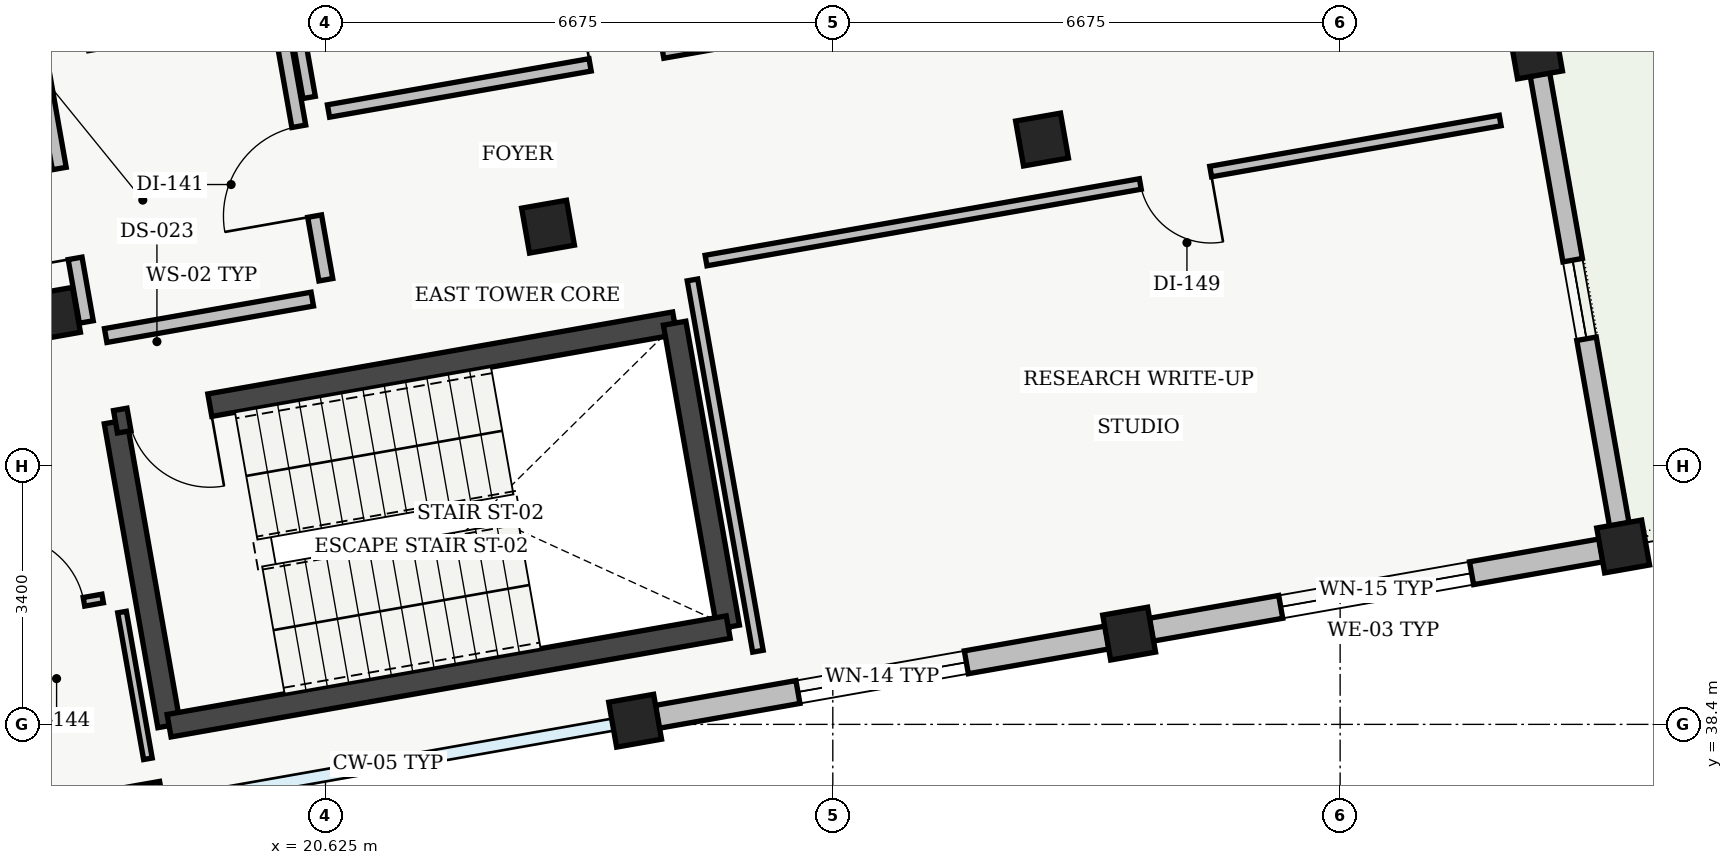
"""IFC4 building model, lengths in metres.
Left out: names, types, materials, properties, quantities, classifications, styles, units other than length and angle.
Written with IfcOpenShell. Run it as: python <this file> out.ifc"""

import sys

from ifc_helpers import new_model, si_unit, direction, frame, frame_2d, origin, origin_2d, place, context, subcontext, project, spatial, rectangle, extrude, element, fill, save


model = new_model("IFC4")
c1 = context("Model", 3, precision=1e-05, world=origin(), true_north=direction((0.0, 1.0)))
c2 = subcontext(c1, "Body", "Model", "MODEL_VIEW")
j1 = project(units=[si_unit("LENGTHUNIT", "METRE"), si_unit("PLANEANGLEUNIT", "RADIAN")], contexts=[c1])
p1 = place(None, origin())
s1 = spatial("IfcSite", under=j1, at=p1, CompositionType="ELEMENT")
p2 = place(p1, origin())
s2 = spatial("IfcBuilding", under=s1, at=p2, CompositionType="ELEMENT")
p3 = place(p2, frame((0.0, 0.0, 36.6)))
s3 = spatial("IfcBuildingStorey", under=s2, at=p3, CompositionType="ELEMENT", Elevation=36.6)
for number, where, z_axis, x_axis in (
    (1, (18.199, 37.302, 0.0), (0.0, 0.0, 1.0), (0.985, 0.174, 0.0)),
    (2, (17.053, 43.802, 0.0), (0.0, 0.0, 1.0), (0.985, 0.174, 0.0)),
    (3, (24.699, 38.448, 0.0), (0.0, 0.0, 1.0), (0.985, 0.174, 0.0)),
    (4, (23.553, 44.948, 0.0), (0.0, 0.0, 1.0), (0.985, 0.174, 0.0)),
    (5, (31.199, 39.594, 0.0), (0.0, 0.0, 1.0), (0.985, 0.174, 0.0)),
    (6, (30.053, 46.094, 0.0), (0.0, 0.0, 1.0), (0.985, 0.174, 0.0)),
    (7, (37.699, 40.74, 0.0), (0.0, 0.0, 1.0), (0.985, 0.174, 0.0)),
    (8, (36.552, 47.24, 0.0), (0.0, 0.0, 1.0), (0.985, 0.174, 0.0)),
):
    element("IfcColumn", number, at=place(p3, frame(where, z_axis=z_axis, x_axis=x_axis)), inside=s3, PredefinedType="COLUMN", context=c2, shape_type="SweptSolid", body=[
        extrude(rectangle(XDim=0.6, YDim=0.6, at=origin_2d()), origin(), (0.0, 0.0, 1.0), 4.02),
    ])
p4 = place(p3, frame((36.604, 46.95, 0.0), z_axis=(0.0, 0.0, 1.0), x_axis=(0.173660194111, -0.984805634113, 0.0)))
e9 = element("IfcWall", 9, at=p4, inside=s3, PredefinedType="STANDARD", context=c2, shape_type="SweptSolid", body=[
    extrude(rectangle(XDim=6.01, YDim=0.26, at=frame_2d((3.005, 0.0))), origin(), (0.0, 0.0, 1.0), 3.555),
])
p5 = place(p4, frame((2.48, 0.0, 0.95)))
e10 = element("IfcOpeningElement", 10, at=p5, cuts=e9, PredefinedType="OPENING", context=c2, shape_type="SweptSolid", body=[
    extrude(rectangle(XDim=1.05, YDim=1.2, at=frame_2d((0.525, 0.6))), frame((0.0, 0.13, 0.0), z_axis=(0.0, -1.0, 0.0), x_axis=(1.0, 0.0, 0.0)), (0.0, 0.0, 1.0), 0.26),
])
p6 = place(p3, frame((37.408, 40.689, 0.0), z_axis=(0.0, 0.0, 1.0), x_axis=(-0.984805634113, -0.173660194111, 0.0)))
e11 = element("IfcWall", 11, at=p6, inside=s3, PredefinedType="STANDARD", context=c2, shape_type="SweptSolid", body=[
    extrude(rectangle(XDim=6.01, YDim=0.305, at=frame_2d((3.005, 0.0))), origin(), (0.0, 0.0, 1.0), 3.555),
])
p7 = place(p6, frame((1.73, 0.0, 0.95)))
e12 = element("IfcOpeningElement", 12, at=p7, cuts=e11, PredefinedType="OPENING", context=c2, shape_type="SweptSolid", body=[
    extrude(rectangle(XDim=2.55, YDim=1.75, at=frame_2d((1.275, 0.875))), frame((0.0, 0.152, 0.0), z_axis=(0.0, -1.0, 0.0), x_axis=(1.0, 0.0, 0.0)), (0.0, 0.0, 1.0), 0.305),
])
p8 = place(p3, frame((30.908, 39.543, 0.0), z_axis=(0.0, 0.0, 1.0), x_axis=(-0.984812580657, -0.173620796507, 0.0)))
e13 = element("IfcWall", 13, at=p8, inside=s3, PredefinedType="STANDARD", context=c2, shape_type="SweptSolid", body=[
    extrude(rectangle(XDim=6.01, YDim=0.305, at=frame_2d((3.005, 0.0))), origin(), (0.0, 0.0, 1.0), 3.555),
])
p9 = place(p8, frame((1.88, 0.0, 0.95)))
e14 = element("IfcOpeningElement", 14, at=p9, cuts=e13, PredefinedType="OPENING", context=c2, shape_type="SweptSolid", body=[
    extrude(rectangle(XDim=2.25, YDim=1.55, at=frame_2d((1.125, 0.775))), frame((0.0, 0.152, 0.0), z_axis=(0.0, -1.0, 0.0), x_axis=(1.0, 0.0, 0.0)), (0.0, 0.0, 1.0), 0.305),
])
p10 = place(p3, frame((18.567, 38.383, 0.0), z_axis=(0.0, 0.0, 1.0), x_axis=(-0.173606946886, 0.984815022221, 0.0)))
e15 = element("IfcWall", 15, at=p10, inside=s3, PredefinedType="SHEAR", context=c2, shape_type="SweptSolid", body=[
    extrude(rectangle(XDim=4.06, YDim=0.3, at=frame_2d((2.03, 0.0))), origin(), (0.0, 0.0, 1.0), 3.98),
])
p11 = place(p3, frame((17.863, 42.381, 0.0), z_axis=(0.0, 0.0, 1.0), x_axis=(0.984808225754, 0.173645496596, 0.0)))
e16 = element("IfcWall", 16, at=p11, inside=s3, PredefinedType="SHEAR", context=c2, shape_type="SweptSolid", body=[
    extrude(rectangle(XDim=7.47, YDim=0.3, at=frame_2d((3.735, 0.0))), origin(), (0.0, 0.0, 1.0), 3.98),
])
p12 = place(p11, frame((0.18, 0.0, 0.0)))
e17 = element("IfcOpeningElement", 17, at=p12, cuts=e16, PredefinedType="OPENING", context=c2, shape_type="SweptSolid", body=[
    extrude(rectangle(XDim=1.08, YDim=2.15, at=frame_2d((0.54, 1.075))), frame((0.0, 0.15, 0.0), z_axis=(0.0, -1.0, 0.0), x_axis=(1.0, 0.0, 0.0)), (0.0, 0.0, 1.0), 0.3),
])
p13 = place(p3, frame((25.219, 43.678, 0.0), z_axis=(0.0, 0.0, 1.0), x_axis=(0.173665267602, -0.984804739443, 0.0)))
e18 = element("IfcWall", 18, at=p13, inside=s3, PredefinedType="SHEAR", context=c2, shape_type="SweptSolid", body=[
    extrude(rectangle(XDim=4.06, YDim=0.3, at=frame_2d((2.03, 0.0))), origin(), (0.0, 0.0, 1.0), 3.98),
])
p14 = place(p3, frame((25.924, 39.68, 0.0), z_axis=(0.0, 0.0, 1.0), x_axis=(-0.984809211193, -0.173639907711, 0.0)))
e19 = element("IfcWall", 19, at=p14, inside=s3, PredefinedType="SHEAR", context=c2, shape_type="SweptSolid", body=[
    extrude(rectangle(XDim=7.47, YDim=0.3, at=frame_2d((3.735, 0.0))), origin(), (0.0, 0.0, 1.0), 3.98),
])
p15 = place(p3, frame((17.733, 43.516, 0.0), z_axis=(0.0, 0.0, 1.0), x_axis=(0.984808483292, 0.173644035992, 0.0)))
e20 = element("IfcWall", 20, at=p15, inside=s3, PredefinedType="SOLIDWALL", context=c2, shape_type="SweptSolid", body=[
    extrude(rectangle(XDim=2.76, YDim=0.185, at=frame_2d((1.38, 0.0))), origin(), (0.0, 0.0, 1.0), 3.65),
])
p16 = place(p3, frame((20.63, 44.25, 0.0), z_axis=(0.0, 0.0, 1.0), x_axis=(-0.173621956536, 0.984812376145, 0.0)))
e21 = element("IfcWall", 21, at=p16, inside=s3, PredefinedType="SOLIDWALL", context=c2, shape_type="SweptSolid", body=[
    extrude(rectangle(XDim=3.41, YDim=0.185, at=frame_2d((1.705, 0.0))), origin(), (0.0, 0.0, 1.0), 3.65),
])
p17 = place(p16, frame((0.85, 0.0, 0.0)))
e22 = element("IfcOpeningElement", 22, at=p17, cuts=e21, PredefinedType="OPENING", context=c2, shape_type="SweptSolid", body=[
    extrude(rectangle(XDim=1.2, YDim=2.15, at=frame_2d((0.6, 1.075))), frame((0.0, 0.093, 0.0), z_axis=(0.0, -1.0, 0.0), x_axis=(1.0, 0.0, 0.0)), (0.0, 0.0, 1.0), 0.185),
])
p18 = place(p3, frame((16.886, 47.052, 0.0), z_axis=(0.0, 0.0, 1.0), x_axis=(0.173621956536, -0.984812376145, 0.0)))
e23 = element("IfcWall", 23, at=p18, inside=s3, PredefinedType="SOLIDWALL", context=c2, shape_type="SweptSolid", body=[
    extrude(rectangle(XDim=3.41, YDim=0.185, at=frame_2d((1.705, 0.0))), origin(), (0.0, 0.0, 1.0), 3.65),
])
p19 = place(p18, frame((1.36, 0.0, 0.0)))
e24 = element("IfcOpeningElement", 24, at=p19, cuts=e23, PredefinedType="OPENING", context=c2, shape_type="SweptSolid", body=[
    extrude(rectangle(XDim=1.2, YDim=2.15, at=frame_2d((0.6, 1.075))), frame((0.0, 0.093, 0.0), z_axis=(0.0, -1.0, 0.0), x_axis=(1.0, 0.0, 0.0)), (0.0, 0.0, 1.0), 0.185),
])
p20 = place(p3, frame((18.289, 37.948, 0.0), z_axis=(0.0, 0.0, 1.0), x_axis=(-0.173643211285, 0.984808628706, 0.0)))
e25 = element("IfcWall", 25, at=p20, inside=s3, PredefinedType="PARTITIONING", context=c2, shape_type="SweptSolid", body=[
    extrude(rectangle(XDim=1.96, YDim=0.115, at=frame_2d((0.98, 0.0))), origin(), (0.0, 0.0, 1.0), 3.455),
])
p21 = place(p3, frame((17.694, 40.056, 0.0), z_axis=(0.0, 0.0, 1.0), x_axis=(-0.984797734253, -0.173704987291, 0.0)))
e26 = element("IfcWall", 26, at=p21, inside=s3, PredefinedType="PARTITIONING", context=c2, shape_type="SweptSolid", body=[
    extrude(rectangle(XDim=1.56, YDim=0.115, at=frame_2d((0.78, 0.0))), origin(), (0.0, 0.0, 1.0), 3.65),
])
p22 = place(p21, frame((0.25, 0.0, 0.0)))
e27 = element("IfcOpeningElement", 27, at=p22, cuts=e26, PredefinedType="OPENING", context=c2, shape_type="SweptSolid", body=[
    extrude(rectangle(XDim=1.06, YDim=2.12, at=frame_2d((0.53, 1.06))), frame((0.0, 0.058, 0.0), z_axis=(0.0, -1.0, 0.0), x_axis=(1.0, 0.0, 0.0)), (0.0, 0.0, 1.0), 0.115),
])
p23 = place(p3, frame((20.665, 46.469, 0.0), z_axis=(0.0, 0.0, 1.0), x_axis=(0.984806090425, 0.173657606403, 0.0)))
e28 = element("IfcWall", 28, at=p23, inside=s3, PredefinedType="PARTITIONING", context=c2, shape_type="SweptSolid", body=[
    extrude(rectangle(XDim=7.96, YDim=0.165, at=frame_2d((3.98, 0.0))), origin(), (0.0, 0.0, 1.0), 3.555),
])
p24 = place(p23, frame((3.495, 0.0, 0.0)))
e29 = element("IfcOpeningElement", 29, at=p24, cuts=e28, PredefinedType="OPENING", context=c2, shape_type="SweptSolid", body=[
    extrude(rectangle(XDim=0.97, YDim=2.12, at=frame_2d((0.485, 1.06))), frame((0.0, 0.083, 0.0), z_axis=(0.0, -1.0, 0.0), x_axis=(1.0, 0.0, 0.0)), (0.0, 0.0, 1.0), 0.165),
])
p25 = place(p3, frame((18.611, 56.851, 0.0), z_axis=(0.0, 0.0, 1.0), x_axis=(0.173654930775, -0.984806562233, 0.0)))
e30 = element("IfcWall", 30, at=p25, inside=s3, PredefinedType="PARTITIONING", context=c2, shape_type="SweptSolid", body=[
    extrude(rectangle(XDim=10.36, YDim=0.165, at=frame_2d((5.18, 0.0))), origin(), (0.0, 0.0, 1.0), 3.65),
])
p26 = place(p3, frame((36.081, 46.345, 0.0), z_axis=(0.0, 0.0, 1.0), x_axis=(-0.984805557657, -0.173660627684, 0.0)))
e31 = element("IfcWall", 31, at=p26, inside=s3, PredefinedType="PARTITIONING", context=c2, shape_type="SweptSolid", body=[
    extrude(rectangle(XDim=10.61, YDim=0.14, at=frame_2d((5.305, 0.0))), origin(), (0.0, 0.0, 1.0), 3.65),
])
p27 = place(p26, frame((3.868, 0.0, 0.0)))
e32 = element("IfcOpeningElement", 32, at=p27, cuts=e31, PredefinedType="OPENING", context=c2, shape_type="SweptSolid", body=[
    extrude(rectangle(XDim=0.94, YDim=2.12, at=frame_2d((0.47, 1.06))), frame((0.0, 0.07, 0.0), z_axis=(0.0, -1.0, 0.0), x_axis=(1.0, 0.0, 0.0)), (0.0, 0.0, 1.0), 0.14),
])
p28 = place(p3, frame((25.454, 44.247, 0.0), z_axis=(0.0, 0.0, 1.0), x_axis=(0.173658971256, -0.98480584975, 0.0)))
e33 = element("IfcWall", 33, at=p28, inside=s3, PredefinedType="PARTITIONING", context=c2, shape_type="SweptSolid", body=[
    extrude(rectangle(XDim=4.96, YDim=0.14, at=frame_2d((2.48, 0.0))), origin(), (0.0, 0.0, 1.0), 3.65),
])
p29 = place(p5, origin())
e34 = element("IfcWindow", 34, at=p29, inside=s3, PartitioningType="SINGLE_PANEL", PredefinedType="WINDOW", context=c2, shape_type="SweptSolid", body=[
    extrude(rectangle(XDim=1.05, YDim=1.2, at=frame_2d((0.525, 0.6))), frame((0.0, 0.03, 0.0), z_axis=(0.0, -1.0, 0.0), x_axis=(1.0, 0.0, 0.0)), (0.0, 0.0, 1.0), 0.06),
])
fill(e10, e34)
p30 = place(p7, origin())
e35 = element("IfcWindow", 35, at=p30, inside=s3, PartitioningType="SINGLE_PANEL", PredefinedType="WINDOW", context=c2, shape_type="SweptSolid", body=[
    extrude(rectangle(XDim=2.55, YDim=1.75, at=frame_2d((1.275, 0.875))), frame((0.0, 0.03, 0.0), z_axis=(0.0, -1.0, 0.0), x_axis=(1.0, 0.0, 0.0)), (0.0, 0.0, 1.0), 0.06),
])
fill(e12, e35)
p31 = place(p9, origin())
e36 = element("IfcWindow", 36, at=p31, inside=s3, PartitioningType="SINGLE_PANEL", PredefinedType="WINDOW", context=c2, shape_type="SweptSolid", body=[
    extrude(rectangle(XDim=2.25, YDim=1.55, at=frame_2d((1.125, 0.775))), frame((0.0, 0.03, 0.0), z_axis=(0.0, -1.0, 0.0), x_axis=(1.0, 0.0, 0.0)), (0.0, 0.0, 1.0), 0.06),
])
fill(e14, e36)
p32 = place(p12, origin())
e37 = element("IfcDoor", 37, at=p32, inside=s3, OperationType="SINGLE_SWING_RIGHT", PredefinedType="DOOR", context=c2, shape_type="SweptSolid", body=[
    extrude(rectangle(XDim=1.08, YDim=2.15, at=frame_2d((0.54, 1.075))), frame((0.0, 0.025, 0.0), z_axis=(0.0, -1.0, 0.0), x_axis=(1.0, 0.0, 0.0)), (0.0, 0.0, 1.0), 0.05),
])
fill(e17, e37)
p33 = place(p17, origin())
e38 = element("IfcDoor", 38, at=p33, inside=s3, OperationType="SINGLE_SWING_LEFT", PredefinedType="DOOR", context=c2, shape_type="SweptSolid", body=[
    extrude(rectangle(XDim=1.2, YDim=2.15, at=frame_2d((0.6, 1.075))), frame((0.0, 0.025, 0.0), z_axis=(0.0, -1.0, 0.0), x_axis=(1.0, 0.0, 0.0)), (0.0, 0.0, 1.0), 0.05),
])
fill(e22, e38)
p34 = place(p19, origin())
e39 = element("IfcDoor", 39, at=p34, inside=s3, OperationType="SINGLE_SWING_RIGHT", PredefinedType="DOOR", context=c2, shape_type="SweptSolid", body=[
    extrude(rectangle(XDim=1.2, YDim=2.15, at=frame_2d((0.6, 1.075))), frame((0.0, 0.025, 0.0), z_axis=(0.0, -1.0, 0.0), x_axis=(1.0, 0.0, 0.0)), (0.0, 0.0, 1.0), 0.05),
])
fill(e24, e39)
p35 = place(p22, origin())
e40 = element("IfcDoor", 40, at=p35, inside=s3, OperationType="SINGLE_SWING_RIGHT", PredefinedType="DOOR", context=c2, shape_type="SweptSolid", body=[
    extrude(rectangle(XDim=1.06, YDim=2.12, at=frame_2d((0.53, 1.06))), frame((0.0, 0.025, 0.0), z_axis=(0.0, -1.0, 0.0), x_axis=(1.0, 0.0, 0.0)), (0.0, 0.0, 1.0), 0.05),
])
fill(e27, e40)
p36 = place(p24, origin())
e41 = element("IfcDoor", 41, at=p36, inside=s3, OperationType="SINGLE_SWING_LEFT", PredefinedType="DOOR", context=c2, shape_type="SweptSolid", body=[
    extrude(rectangle(XDim=0.97, YDim=2.12, at=frame_2d((0.485, 1.06))), frame((0.0, 0.025, 0.0), z_axis=(0.0, -1.0, 0.0), x_axis=(1.0, 0.0, 0.0)), (0.0, 0.0, 1.0), 0.05),
])
fill(e29, e41)
p37 = place(p27, origin())
e42 = element("IfcDoor", 42, at=p37, inside=s3, OperationType="SINGLE_SWING_LEFT", PredefinedType="DOOR", context=c2, shape_type="SweptSolid", body=[
    extrude(rectangle(XDim=0.94, YDim=2.12, at=frame_2d((0.47, 1.06))), frame((0.0, 0.025, 0.0), z_axis=(0.0, -1.0, 0.0), x_axis=(1.0, 0.0, 0.0)), (0.0, 0.0, 1.0), 0.05),
])
fill(e32, e42)
save(model, sys.argv[1])
